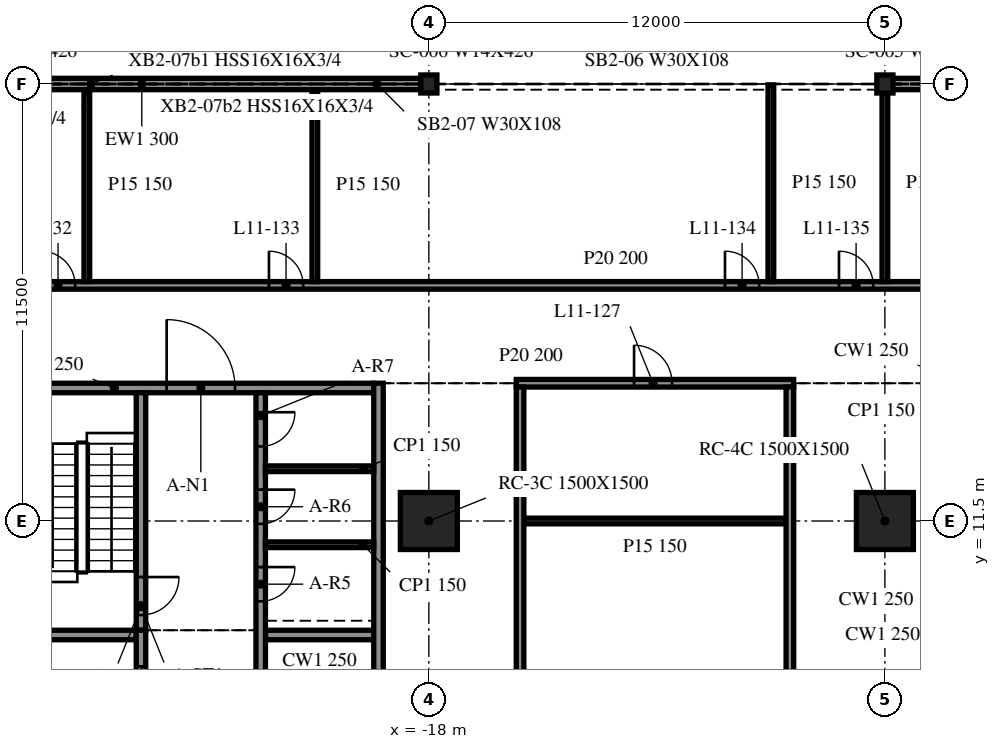
"""IFC4 building model, lengths in metres.
Left out: names, types, materials, properties, quantities, classifications, styles, units other than length and angle.
Written with IfcOpenShell. Run it as: python <this file> out.ifc"""

import sys

from ifc_helpers import new_model, si_unit, direction, frame, frame_2d, origin, origin_2d, place, context, subcontext, project, spatial, rectangle, i_section, extrude, element, fill, save


model = new_model("IFC4")
c1 = context("Model", 3, precision=1e-05, world=origin(), true_north=direction((0.0, 1.0)))
c2 = subcontext(c1, "Body", "Model", "MODEL_VIEW")
j1 = project(units=[si_unit("LENGTHUNIT", "METRE"), si_unit("PLANEANGLEUNIT", "RADIAN")], contexts=[c1])
p1 = place(None, origin())
s1 = spatial("IfcSite", under=j1, at=p1, CompositionType="ELEMENT")
p2 = place(p1, origin())
s2 = spatial("IfcBuilding", under=s1, at=p2, CompositionType="ELEMENT")
p3 = place(p2, frame((0.0, 0.0, 50.3)))
s3 = spatial("IfcBuildingStorey", under=s2, at=p3, CompositionType="ELEMENT", Elevation=50.3)
for number, where, z_axis, x_axis in (
    (1, (-18.0, 11.5, -0.34), (0.0, 0.0, 1.0), (1.0, 0.0, 0.0)),
    (2, (-6.0, 11.5, -0.34), (0.0, 0.0, 1.0), (1.0, 0.0, 0.0)),
):
    element("IfcColumn", number, at=place(p3, frame(where, z_axis=z_axis, x_axis=x_axis)), inside=s3, PredefinedType="COLUMN", context=c2, shape_type="SweptSolid", body=[
        extrude(rectangle(XDim=1.5, YDim=1.5, at=origin_2d()), origin(), (0.0, 0.0, 1.0), 4.3),
    ])
for number, where, z_axis, x_axis in (
    (3, (-6.0, 23.0, -0.34), (0.0, 0.0, 1.0), (1.0, 0.0, 0.0)),
    (4, (-18.0, 23.0, -0.34), (0.0, 0.0, 1.0), (1.0, 0.0, 0.0)),
):
    element("IfcColumn", number, at=place(p3, frame(where, z_axis=z_axis, x_axis=x_axis)), inside=s3, PredefinedType="COLUMN", context=c2, shape_type="SweptSolid", body=[
        extrude(i_section(OverallWidth=0.424, OverallDepth=0.475, WebThickness=0.048, FlangeThickness=0.077, at=origin_2d()), origin(), (0.0, 0.0, 1.0), 4.3),
    ])
for number, where, z_axis, x_axis in (
    (5, (5.976, 23.0, 0.0), (0.0, 0.0, 1.0), (-1.0, 0.0, 0.0)),
    (6, (-18.024, 23.0, 0.0), (0.0, 0.0, 1.0), (-1.0, 0.0, 0.0)),
):
    element("IfcWall", number, at=place(p3, frame(where, z_axis=z_axis, x_axis=x_axis)), inside=s3, PredefinedType="NOTDEFINED", context=c2, shape_type="SweptSolid", body=[
        extrude(rectangle(XDim=11.952, YDim=0.3, at=frame_2d((5.976, 0.0))), origin(), (0.0, 0.0, 1.0), 3.203),
    ])
p4 = place(p3, frame((-19.325, -9.125, 0.0), z_axis=(0.0, 0.0, 1.0), x_axis=(0.0, 1.0, 0.0)))
e7 = element("IfcWall", 7, at=p4, inside=s3, PredefinedType="SOLIDWALL", context=c2, shape_type="SweptSolid", body=[
    extrude(rectangle(XDim=24.25, YDim=0.25, at=frame_2d((12.125, 0.0))), origin(), (0.0, 0.0, 1.0), 3.96),
])
p5 = place(p3, frame((-28.55, 15.0, 0.0), z_axis=(0.0, 0.0, 1.0), x_axis=(1.0, 0.0, 0.0)))
e8 = element("IfcWall", 8, at=p5, inside=s3, PredefinedType="SOLIDWALL", context=c2, shape_type="SweptSolid", body=[
    extrude(rectangle(XDim=9.1, YDim=0.25, at=frame_2d((4.55, 0.0))), origin(), (0.0, 0.0, 1.0), 3.96),
])
p6 = place(p5, frame((3.65, 0.0, 0.0)))
e9 = element("IfcOpeningElement", 9, at=p6, cuts=e8, PredefinedType="OPENING", context=c2, shape_type="SweptSolid", body=[
    extrude(rectangle(XDim=1.8, YDim=2.1, at=frame_2d((0.9, 1.05))), frame((0.0, 0.135, 0.0), z_axis=(0.0, -1.0, 0.0), x_axis=(1.0, 0.0, 0.0)), (0.0, 0.0, 1.0), 0.27),
])
p7 = place(p3, frame((-25.575, -8.875, 0.0), z_axis=(0.0, 0.0, 1.0), x_axis=(0.0, 1.0, 0.0)))
e10 = element("IfcWall", 10, at=p7, inside=s3, PredefinedType="SOLIDWALL", context=c2, shape_type="SweptSolid", body=[
    extrude(rectangle(XDim=17.5, YDim=0.25, at=frame_2d((8.75, 0.0))), origin(), (0.0, 0.0, 1.0), 3.96),
])
p8 = place(p7, frame((7.2, 0.0, 0.0)))
e11 = element("IfcOpeningElement", 11, at=p8, cuts=e10, PredefinedType="OPENING", context=c2, shape_type="SweptSolid", body=[
    extrude(rectangle(XDim=1.1, YDim=2.1, at=frame_2d((0.55, 1.05))), frame((0.0, 0.135, 0.0), z_axis=(0.0, -1.0, 0.0), x_axis=(1.0, 0.0, 0.0)), (0.0, 0.0, 1.0), 0.27),
])
p9 = place(p7, frame((9.95, 0.0, 0.0)))
e12 = element("IfcOpeningElement", 12, at=p9, cuts=e10, PredefinedType="OPENING", context=c2, shape_type="SweptSolid", body=[
    extrude(rectangle(XDim=1.1, YDim=2.1, at=frame_2d((0.55, 1.05))), frame((0.0, 0.135, 0.0), z_axis=(0.0, -1.0, 0.0), x_axis=(1.0, 0.0, 0.0)), (0.0, 0.0, 1.0), 0.27),
])
p10 = place(p7, frame((12.7, 0.0, 0.0)))
e13 = element("IfcOpeningElement", 13, at=p10, cuts=e10, PredefinedType="OPENING", context=c2, shape_type="SweptSolid", body=[
    extrude(rectangle(XDim=1.1, YDim=2.1, at=frame_2d((0.55, 1.05))), frame((0.0, 0.135, 0.0), z_axis=(0.0, -1.0, 0.0), x_axis=(1.0, 0.0, 0.0)), (0.0, 0.0, 1.0), 0.27),
])
p11 = place(p7, frame((15.45, 0.0, 0.0)))
e14 = element("IfcOpeningElement", 14, at=p11, cuts=e10, PredefinedType="OPENING", context=c2, shape_type="SweptSolid", body=[
    extrude(rectangle(XDim=1.1, YDim=2.1, at=frame_2d((0.55, 1.05))), frame((0.0, 0.135, 0.0), z_axis=(0.0, -1.0, 0.0), x_axis=(1.0, 0.0, 0.0)), (0.0, 0.0, 1.0), 0.27),
])
p12 = place(p7, frame((1.012, 0.0, 0.0)))
e15 = element("IfcOpeningElement", 15, at=p12, cuts=e10, PredefinedType="OPENING", context=c2, shape_type="SweptSolid", body=[
    extrude(rectangle(XDim=0.9, YDim=2.1, at=frame_2d((0.45, 1.05))), frame((0.0, 0.135, 0.0), z_axis=(0.0, -1.0, 0.0), x_axis=(1.0, 0.0, 0.0)), (0.0, 0.0, 1.0), 0.27),
])
p13 = place(p7, frame((4.087, 0.0, 0.0)))
e16 = element("IfcOpeningElement", 16, at=p13, cuts=e10, PredefinedType="OPENING", context=c2, shape_type="SweptSolid", body=[
    extrude(rectangle(XDim=0.9, YDim=2.1, at=frame_2d((0.45, 1.05))), frame((0.0, 0.135, 0.0), z_axis=(0.0, -1.0, 0.0), x_axis=(1.0, 0.0, 0.0)), (0.0, 0.0, 1.0), 0.27),
])
p14 = place(p3, frame((-25.575, 14.875, 0.0), z_axis=(0.0, 0.0, 1.0), x_axis=(0.0, -1.0, 0.0)))
e17 = element("IfcWall", 17, at=p14, inside=s3, PredefinedType="SOLIDWALL", context=c2, shape_type="SweptSolid", body=[
    extrude(rectangle(XDim=6.25, YDim=0.25, at=frame_2d((3.125, 0.0))), origin(), (0.0, 0.0, 1.0), 3.96),
])
p15 = place(p14, frame((4.85, 0.0, 0.0)))
e18 = element("IfcOpeningElement", 18, at=p15, cuts=e17, PredefinedType="OPENING", context=c2, shape_type="SweptSolid", body=[
    extrude(rectangle(XDim=1.0, YDim=2.1, at=frame_2d((0.5, 1.05))), frame((0.0, 0.135, 0.0), z_axis=(0.0, -1.0, 0.0), x_axis=(1.0, 0.0, 0.0)), (0.0, 0.0, 1.0), 0.27),
])
p16 = place(p3, frame((-22.425, 14.875, 0.0), z_axis=(0.0, 0.0, 1.0), x_axis=(0.0, -1.0, 0.0)))
e19 = element("IfcWall", 19, at=p16, inside=s3, PredefinedType="SOLIDWALL", context=c2, shape_type="SweptSolid", body=[
    extrude(rectangle(XDim=23.75, YDim=0.25, at=frame_2d((11.875, 0.0))), origin(), (0.0, 0.0, 1.0), 3.96),
])
p17 = place(p16, frame((15.45, 0.0, 0.0)))
e20 = element("IfcOpeningElement", 20, at=p17, cuts=e19, PredefinedType="OPENING", context=c2, shape_type="SweptSolid", body=[
    extrude(rectangle(XDim=1.1, YDim=2.1, at=frame_2d((0.55, 1.05))), frame((0.0, 0.135, 0.0), z_axis=(0.0, -1.0, 0.0), x_axis=(1.0, 0.0, 0.0)), (0.0, 0.0, 1.0), 0.27),
])
p18 = place(p16, frame((12.7, 0.0, 0.0)))
e21 = element("IfcOpeningElement", 21, at=p18, cuts=e19, PredefinedType="OPENING", context=c2, shape_type="SweptSolid", body=[
    extrude(rectangle(XDim=1.1, YDim=2.1, at=frame_2d((0.55, 1.05))), frame((0.0, 0.135, 0.0), z_axis=(0.0, -1.0, 0.0), x_axis=(1.0, 0.0, 0.0)), (0.0, 0.0, 1.0), 0.27),
])
p19 = place(p16, frame((21.837, 0.0, 0.0)))
e22 = element("IfcOpeningElement", 22, at=p19, cuts=e19, PredefinedType="OPENING", context=c2, shape_type="SweptSolid", body=[
    extrude(rectangle(XDim=0.9, YDim=2.1, at=frame_2d((0.45, 1.05))), frame((0.0, 0.135, 0.0), z_axis=(0.0, -1.0, 0.0), x_axis=(1.0, 0.0, 0.0)), (0.0, 0.0, 1.0), 0.27),
])
p20 = place(p16, frame((18.762, 0.0, 0.0)))
e23 = element("IfcOpeningElement", 23, at=p20, cuts=e19, PredefinedType="OPENING", context=c2, shape_type="SweptSolid", body=[
    extrude(rectangle(XDim=0.9, YDim=2.1, at=frame_2d((0.45, 1.05))), frame((0.0, 0.135, 0.0), z_axis=(0.0, -1.0, 0.0), x_axis=(1.0, 0.0, 0.0)), (0.0, 0.0, 1.0), 0.27),
])
p21 = place(p16, frame((4.587, 0.0, 0.0)))
e24 = element("IfcOpeningElement", 24, at=p21, cuts=e19, PredefinedType="OPENING", context=c2, shape_type="SweptSolid", body=[
    extrude(rectangle(XDim=0.9, YDim=2.1, at=frame_2d((0.45, 1.05))), frame((0.0, 0.135, 0.0), z_axis=(0.0, -1.0, 0.0), x_axis=(1.0, 0.0, 0.0)), (0.0, 0.0, 1.0), 0.27),
])
p22 = place(p16, frame((2.55, 0.0, 0.0)))
e25 = element("IfcOpeningElement", 25, at=p22, cuts=e19, PredefinedType="OPENING", context=c2, shape_type="SweptSolid", body=[
    extrude(rectangle(XDim=0.9, YDim=2.1, at=frame_2d((0.45, 1.05))), frame((0.0, 0.135, 0.0), z_axis=(0.0, -1.0, 0.0), x_axis=(1.0, 0.0, 0.0)), (0.0, 0.0, 1.0), 0.27),
])
p23 = place(p16, frame((0.512, 0.0, 0.0)))
e26 = element("IfcOpeningElement", 26, at=p23, cuts=e19, PredefinedType="OPENING", context=c2, shape_type="SweptSolid", body=[
    extrude(rectangle(XDim=0.9, YDim=2.1, at=frame_2d((0.45, 1.05))), frame((0.0, 0.135, 0.0), z_axis=(0.0, -1.0, 0.0), x_axis=(1.0, 0.0, 0.0)), (0.0, 0.0, 1.0), 0.27),
])
for number, where, z_axis, x_axis in (
    (27, (-28.55, 8.5, 0.0), (0.0, 0.0, 1.0), (1.0, 0.0, 0.0)),
    (28, (-22.3, 8.5, 0.0), (0.0, 0.0, 1.0), (1.0, 0.0, 0.0)),
):
    element("IfcWall", number, at=place(p3, frame(where, z_axis=z_axis, x_axis=x_axis)), inside=s3, PredefinedType="SOLIDWALL", context=c2, shape_type="SweptSolid", body=[
        extrude(rectangle(XDim=2.85, YDim=0.25, at=frame_2d((1.425, 0.0))), origin(), (0.0, 0.0, 1.0), 3.96),
    ])
for number, where, z_axis, x_axis in (
    (29, (-22.3, 10.875, 0.0), (0.0, 0.0, 1.0), (1.0, 0.0, 0.0)),
    (30, (-22.3, 12.875, 0.0), (0.0, 0.0, 1.0), (1.0, 0.0, 0.0)),
):
    element("IfcWall", number, at=place(p3, frame(where, z_axis=z_axis, x_axis=x_axis)), inside=s3, PredefinedType="PARTITIONING", context=c2, shape_type="SweptSolid", body=[
        extrude(rectangle(XDim=2.85, YDim=0.15, at=frame_2d((1.425, 0.0))), origin(), (0.0, 0.0, 1.0), 3.96),
    ])
p24 = place(p3, frame((-15.5, 11.5, 0.0), z_axis=(0.0, 0.0, 1.0), x_axis=(1.0, 0.0, 0.0)))
e31 = element("IfcWall", 31, at=p24, inside=s3, PredefinedType="PARTITIONING", context=c2, shape_type="SweptSolid", body=[
    extrude(rectangle(XDim=6.9, YDim=0.15, at=frame_2d((3.45, 0.0))), origin(), (0.0, 0.0, 1.0), 3.96),
])
p25 = place(p3, frame((-15.7, 15.125, 0.0), z_axis=(0.0, 0.0, 1.0), x_axis=(1.0, 0.0, 0.0)))
e32 = element("IfcWall", 32, at=p25, inside=s3, PredefinedType="PARTITIONING", context=c2, shape_type="SweptSolid", body=[
    extrude(rectangle(XDim=7.3, YDim=0.2, at=frame_2d((3.65, 0.0))), origin(), (0.0, 0.0, 1.0), 3.96),
])
p26 = place(p25, frame((3.1, 0.0, 0.0)))
e33 = element("IfcOpeningElement", 33, at=p26, cuts=e32, PredefinedType="OPENING", context=c2, shape_type="SweptSolid", body=[
    extrude(rectangle(XDim=1.0, YDim=2.1, at=frame_2d((0.5, 1.05))), frame((0.0, 0.11, 0.0), z_axis=(0.0, -1.0, 0.0), x_axis=(1.0, 0.0, 0.0)), (0.0, 0.0, 1.0), 0.22),
])
p27 = place(p3, frame((-41.708, 17.7, 0.0), z_axis=(0.0, 0.0, 1.0), x_axis=(1.0, 0.0, 0.0)))
e34 = element("IfcWall", 34, at=p27, inside=s3, PredefinedType="PARTITIONING", context=c2, shape_type="SweptSolid", body=[
    extrude(rectangle(XDim=95.416, YDim=0.2, at=frame_2d((47.708, 0.0))), origin(), (0.0, 0.0, 1.0), 3.96),
])
p28 = place(p27, frame((7.5, 0.0, 0.0)))
e35 = element("IfcOpeningElement", 35, at=p28, cuts=e34, PredefinedType="OPENING", context=c2, shape_type="SweptSolid", body=[
    extrude(rectangle(XDim=0.9, YDim=2.1, at=frame_2d((0.45, 1.05))), frame((0.0, 0.11, 0.0), z_axis=(0.0, -1.0, 0.0), x_axis=(1.0, 0.0, 0.0)), (0.0, 0.0, 1.0), 0.22),
])
p29 = place(p27, frame((13.5, 0.0, 0.0)))
e36 = element("IfcOpeningElement", 36, at=p29, cuts=e34, PredefinedType="OPENING", context=c2, shape_type="SweptSolid", body=[
    extrude(rectangle(XDim=0.9, YDim=2.1, at=frame_2d((0.45, 1.05))), frame((0.0, 0.11, 0.0), z_axis=(0.0, -1.0, 0.0), x_axis=(1.0, 0.0, 0.0)), (0.0, 0.0, 1.0), 0.22),
])
p30 = place(p27, frame((19.5, 0.0, 0.0)))
e37 = element("IfcOpeningElement", 37, at=p30, cuts=e34, PredefinedType="OPENING", context=c2, shape_type="SweptSolid", body=[
    extrude(rectangle(XDim=0.9, YDim=2.1, at=frame_2d((0.45, 1.05))), frame((0.0, 0.11, 0.0), z_axis=(0.0, -1.0, 0.0), x_axis=(1.0, 0.0, 0.0)), (0.0, 0.0, 1.0), 0.22),
])
p31 = place(p27, frame((31.5, 0.0, 0.0)))
e38 = element("IfcOpeningElement", 38, at=p31, cuts=e34, PredefinedType="OPENING", context=c2, shape_type="SweptSolid", body=[
    extrude(rectangle(XDim=0.9, YDim=2.1, at=frame_2d((0.45, 1.05))), frame((0.0, 0.11, 0.0), z_axis=(0.0, -1.0, 0.0), x_axis=(1.0, 0.0, 0.0)), (0.0, 0.0, 1.0), 0.22),
])
p32 = place(p27, frame((34.5, 0.0, 0.0)))
e39 = element("IfcOpeningElement", 39, at=p32, cuts=e34, PredefinedType="OPENING", context=c2, shape_type="SweptSolid", body=[
    extrude(rectangle(XDim=0.9, YDim=2.1, at=frame_2d((0.45, 1.05))), frame((0.0, 0.11, 0.0), z_axis=(0.0, -1.0, 0.0), x_axis=(1.0, 0.0, 0.0)), (0.0, 0.0, 1.0), 0.22),
])
p33 = place(p27, frame((43.5, 0.0, 0.0)))
e40 = element("IfcOpeningElement", 40, at=p33, cuts=e34, PredefinedType="OPENING", context=c2, shape_type="SweptSolid", body=[
    extrude(rectangle(XDim=0.9, YDim=2.1, at=frame_2d((0.45, 1.05))), frame((0.0, 0.11, 0.0), z_axis=(0.0, -1.0, 0.0), x_axis=(1.0, 0.0, 0.0)), (0.0, 0.0, 1.0), 0.22),
])
p34 = place(p27, frame((47.3, 0.0, 0.0)))
e41 = element("IfcOpeningElement", 41, at=p34, cuts=e34, PredefinedType="OPENING", context=c2, shape_type="SweptSolid", body=[
    extrude(rectangle(XDim=0.9, YDim=2.1, at=frame_2d((0.45, 1.05))), frame((0.0, 0.11, 0.0), z_axis=(0.0, -1.0, 0.0), x_axis=(1.0, 0.0, 0.0)), (0.0, 0.0, 1.0), 0.22),
])
p35 = place(p27, frame((51.1, 0.0, 0.0)))
e42 = element("IfcOpeningElement", 42, at=p35, cuts=e34, PredefinedType="OPENING", context=c2, shape_type="SweptSolid", body=[
    extrude(rectangle(XDim=0.9, YDim=2.1, at=frame_2d((0.45, 1.05))), frame((0.0, 0.11, 0.0), z_axis=(0.0, -1.0, 0.0), x_axis=(1.0, 0.0, 0.0)), (0.0, 0.0, 1.0), 0.22),
])
p36 = place(p27, frame((57.1, 0.0, 0.0)))
e43 = element("IfcOpeningElement", 43, at=p36, cuts=e34, PredefinedType="OPENING", context=c2, shape_type="SweptSolid", body=[
    extrude(rectangle(XDim=0.9, YDim=2.1, at=frame_2d((0.45, 1.05))), frame((0.0, 0.11, 0.0), z_axis=(0.0, -1.0, 0.0), x_axis=(1.0, 0.0, 0.0)), (0.0, 0.0, 1.0), 0.22),
])
p37 = place(p27, frame((69.1, 0.0, 0.0)))
e44 = element("IfcOpeningElement", 44, at=p37, cuts=e34, PredefinedType="OPENING", context=c2, shape_type="SweptSolid", body=[
    extrude(rectangle(XDim=0.9, YDim=2.1, at=frame_2d((0.45, 1.05))), frame((0.0, 0.11, 0.0), z_axis=(0.0, -1.0, 0.0), x_axis=(1.0, 0.0, 0.0)), (0.0, 0.0, 1.0), 0.22),
])
p38 = place(p27, frame((72.1, 0.0, 0.0)))
e45 = element("IfcOpeningElement", 45, at=p38, cuts=e34, PredefinedType="OPENING", context=c2, shape_type="SweptSolid", body=[
    extrude(rectangle(XDim=0.9, YDim=2.1, at=frame_2d((0.45, 1.05))), frame((0.0, 0.11, 0.0), z_axis=(0.0, -1.0, 0.0), x_axis=(1.0, 0.0, 0.0)), (0.0, 0.0, 1.0), 0.22),
])
p39 = place(p27, frame((81.1, 0.0, 0.0)))
e46 = element("IfcOpeningElement", 46, at=p39, cuts=e34, PredefinedType="OPENING", context=c2, shape_type="SweptSolid", body=[
    extrude(rectangle(XDim=0.9, YDim=2.1, at=frame_2d((0.45, 1.05))), frame((0.0, 0.11, 0.0), z_axis=(0.0, -1.0, 0.0), x_axis=(1.0, 0.0, 0.0)), (0.0, 0.0, 1.0), 0.22),
])
p40 = place(p27, frame((87.1, 0.0, 0.0)))
e47 = element("IfcOpeningElement", 47, at=p40, cuts=e34, PredefinedType="OPENING", context=c2, shape_type="SweptSolid", body=[
    extrude(rectangle(XDim=0.9, YDim=2.1, at=frame_2d((0.45, 1.05))), frame((0.0, 0.11, 0.0), z_axis=(0.0, -1.0, 0.0), x_axis=(1.0, 0.0, 0.0)), (0.0, 0.0, 1.0), 0.22),
])
for number, where, z_axis, x_axis in (
    (48, (-27.0, 17.8, 0.0), (0.0, 0.0, 1.0), (0.0, 1.0, 0.0)),
    (49, (-21.0, 17.8, 0.0), (0.0, 0.0, 1.0), (0.0, 1.0, 0.0)),
):
    element("IfcWall", number, at=place(p3, frame(where, z_axis=z_axis, x_axis=x_axis)), inside=s3, PredefinedType="PARTITIONING", context=c2, shape_type="SweptSolid", body=[
        extrude(rectangle(XDim=5.05, YDim=0.15, at=frame_2d((2.525, 0.0))), origin(), (0.0, 0.0, 1.0), 3.96),
    ])
p41 = place(p3, frame((-15.6, -9.025, 0.0), z_axis=(0.0, 0.0, 1.0), x_axis=(0.0, 1.0, 0.0)))
e50 = element("IfcWall", 50, at=p41, inside=s3, PredefinedType="PARTITIONING", context=c2, shape_type="SweptSolid", body=[
    extrude(rectangle(XDim=24.05, YDim=0.2, at=frame_2d((12.025, 0.0))), origin(), (0.0, 0.0, 1.0), 3.96),
])
p42 = place(p41, frame((12.3, 0.0, 0.0)))
e51 = element("IfcOpeningElement", 51, at=p42, cuts=e50, PredefinedType="OPENING", context=c2, shape_type="SweptSolid", body=[
    extrude(rectangle(XDim=1.0, YDim=2.1, at=frame_2d((0.5, 1.05))), frame((0.0, 0.11, 0.0), z_axis=(0.0, -1.0, 0.0), x_axis=(1.0, 0.0, 0.0)), (0.0, 0.0, 1.0), 0.22),
])
p43 = place(p3, frame((-9.0, 17.8, 0.0), z_axis=(0.0, 0.0, 1.0), x_axis=(0.0, 1.0, 0.0)))
e52 = element("IfcWall", 52, at=p43, inside=s3, PredefinedType="PARTITIONING", context=c2, shape_type="SweptSolid", body=[
    extrude(rectangle(XDim=5.175, YDim=0.15, at=frame_2d((2.587, 0.0))), origin(), (0.0, 0.0, 1.0), 3.96),
])
p44 = place(p3, frame((-8.5, -9.025, 0.0), z_axis=(0.0, 0.0, 1.0), x_axis=(0.0, 1.0, 0.0)))
e53 = element("IfcWall", 53, at=p44, inside=s3, PredefinedType="PARTITIONING", context=c2, shape_type="SweptSolid", body=[
    extrude(rectangle(XDim=24.05, YDim=0.2, at=frame_2d((12.025, 0.0))), origin(), (0.0, 0.0, 1.0), 3.96),
])
p45 = place(p3, frame((-6.0, 17.8, 0.0), z_axis=(0.0, 0.0, 1.0), x_axis=(0.0, 1.0, 0.0)))
e54 = element("IfcWall", 54, at=p45, inside=s3, PredefinedType="PARTITIONING", context=c2, shape_type="SweptSolid", body=[
    extrude(rectangle(XDim=5.175, YDim=0.15, at=frame_2d((2.587, 0.0))), origin(), (0.0, 0.0, 1.0), 3.96),
])
p46 = place(p6, origin())
e55 = element("IfcDoor", 55, at=p46, inside=s3, OperationType="DOUBLE_DOOR_SINGLE_SWING", PredefinedType="DOOR", context=c2, shape_type="SweptSolid", body=[
    extrude(rectangle(XDim=1.8, YDim=2.1, at=frame_2d((0.9, 1.05))), frame((0.0, 0.025, 0.0), z_axis=(0.0, -1.0, 0.0), x_axis=(1.0, 0.0, 0.0)), (0.0, 0.0, 1.0), 0.05),
])
fill(e9, e55)
p47 = place(p11, origin())
e56 = element("IfcDoor", 56, at=p47, inside=s3, OperationType="DOUBLE_DOOR_SLIDING", PredefinedType="DOOR", context=c2, shape_type="SweptSolid", body=[
    extrude(rectangle(XDim=1.1, YDim=2.1, at=frame_2d((0.55, 1.05))), frame((0.0, 0.025, 0.0), z_axis=(0.0, -1.0, 0.0), x_axis=(1.0, 0.0, 0.0)), (0.0, 0.0, 1.0), 0.05),
])
fill(e14, e56)
p48 = place(p21, origin())
e57 = element("IfcDoor", 57, at=p48, inside=s3, OperationType="SINGLE_SWING_LEFT", PredefinedType="DOOR", context=c2, shape_type="SweptSolid", body=[
    extrude(rectangle(XDim=0.9, YDim=2.1, at=frame_2d((0.45, 1.05))), frame((0.0, 0.025, 0.0), z_axis=(0.0, -1.0, 0.0), x_axis=(1.0, 0.0, 0.0)), (0.0, 0.0, 1.0), 0.05),
])
fill(e24, e57)
p49 = place(p22, origin())
e58 = element("IfcDoor", 58, at=p49, inside=s3, OperationType="SINGLE_SWING_RIGHT", PredefinedType="DOOR", context=c2, shape_type="SweptSolid", body=[
    extrude(rectangle(XDim=0.9, YDim=2.1, at=frame_2d((0.45, 1.05))), frame((0.0, 0.025, 0.0), z_axis=(0.0, -1.0, 0.0), x_axis=(1.0, 0.0, 0.0)), (0.0, 0.0, 1.0), 0.05),
])
fill(e25, e58)
p50 = place(p23, origin())
e59 = element("IfcDoor", 59, at=p50, inside=s3, OperationType="SINGLE_SWING_LEFT", PredefinedType="DOOR", context=c2, shape_type="SweptSolid", body=[
    extrude(rectangle(XDim=0.9, YDim=2.1, at=frame_2d((0.45, 1.05))), frame((0.0, 0.025, 0.0), z_axis=(0.0, -1.0, 0.0), x_axis=(1.0, 0.0, 0.0)), (0.0, 0.0, 1.0), 0.05),
])
fill(e26, e59)
p51 = place(p15, origin())
e60 = element("IfcDoor", 60, at=p51, inside=s3, OperationType="SINGLE_SWING_RIGHT", PredefinedType="DOOR", context=c2, shape_type="SweptSolid", body=[
    extrude(rectangle(XDim=1.0, YDim=2.1, at=frame_2d((0.5, 1.05))), frame((0.0, 0.025, 0.0), z_axis=(0.0, -1.0, 0.0), x_axis=(1.0, 0.0, 0.0)), (0.0, 0.0, 1.0), 0.05),
])
fill(e18, e60)
p52 = place(p26, origin())
e61 = element("IfcDoor", 61, at=p52, inside=s3, OperationType="SINGLE_SWING_RIGHT", PredefinedType="DOOR", context=c2, shape_type="SweptSolid", body=[
    extrude(rectangle(XDim=1.0, YDim=2.1, at=frame_2d((0.5, 1.05))), frame((0.0, 0.025, 0.0), z_axis=(0.0, -1.0, 0.0), x_axis=(1.0, 0.0, 0.0)), (0.0, 0.0, 1.0), 0.05),
])
fill(e33, e61)
p53 = place(p29, origin())
e62 = element("IfcDoor", 62, at=p53, inside=s3, OperationType="SINGLE_SWING_LEFT", PredefinedType="DOOR", context=c2, shape_type="SweptSolid", body=[
    extrude(rectangle(XDim=0.9, YDim=2.1, at=frame_2d((0.45, 1.05))), frame((0.0, 0.025, 0.0), z_axis=(0.0, -1.0, 0.0), x_axis=(1.0, 0.0, 0.0)), (0.0, 0.0, 1.0), 0.05),
])
fill(e36, e62)
p54 = place(p30, origin())
e63 = element("IfcDoor", 63, at=p54, inside=s3, OperationType="SINGLE_SWING_LEFT", PredefinedType="DOOR", context=c2, shape_type="SweptSolid", body=[
    extrude(rectangle(XDim=0.9, YDim=2.1, at=frame_2d((0.45, 1.05))), frame((0.0, 0.025, 0.0), z_axis=(0.0, -1.0, 0.0), x_axis=(1.0, 0.0, 0.0)), (0.0, 0.0, 1.0), 0.05),
])
fill(e37, e63)
p55 = place(p31, origin())
e64 = element("IfcDoor", 64, at=p55, inside=s3, OperationType="SINGLE_SWING_LEFT", PredefinedType="DOOR", context=c2, shape_type="SweptSolid", body=[
    extrude(rectangle(XDim=0.9, YDim=2.1, at=frame_2d((0.45, 1.05))), frame((0.0, 0.025, 0.0), z_axis=(0.0, -1.0, 0.0), x_axis=(1.0, 0.0, 0.0)), (0.0, 0.0, 1.0), 0.05),
])
fill(e38, e64)
p56 = place(p32, origin())
e65 = element("IfcDoor", 65, at=p56, inside=s3, OperationType="SINGLE_SWING_LEFT", PredefinedType="DOOR", context=c2, shape_type="SweptSolid", body=[
    extrude(rectangle(XDim=0.9, YDim=2.1, at=frame_2d((0.45, 1.05))), frame((0.0, 0.025, 0.0), z_axis=(0.0, -1.0, 0.0), x_axis=(1.0, 0.0, 0.0)), (0.0, 0.0, 1.0), 0.05),
])
fill(e39, e65)
save(model, sys.argv[1])
